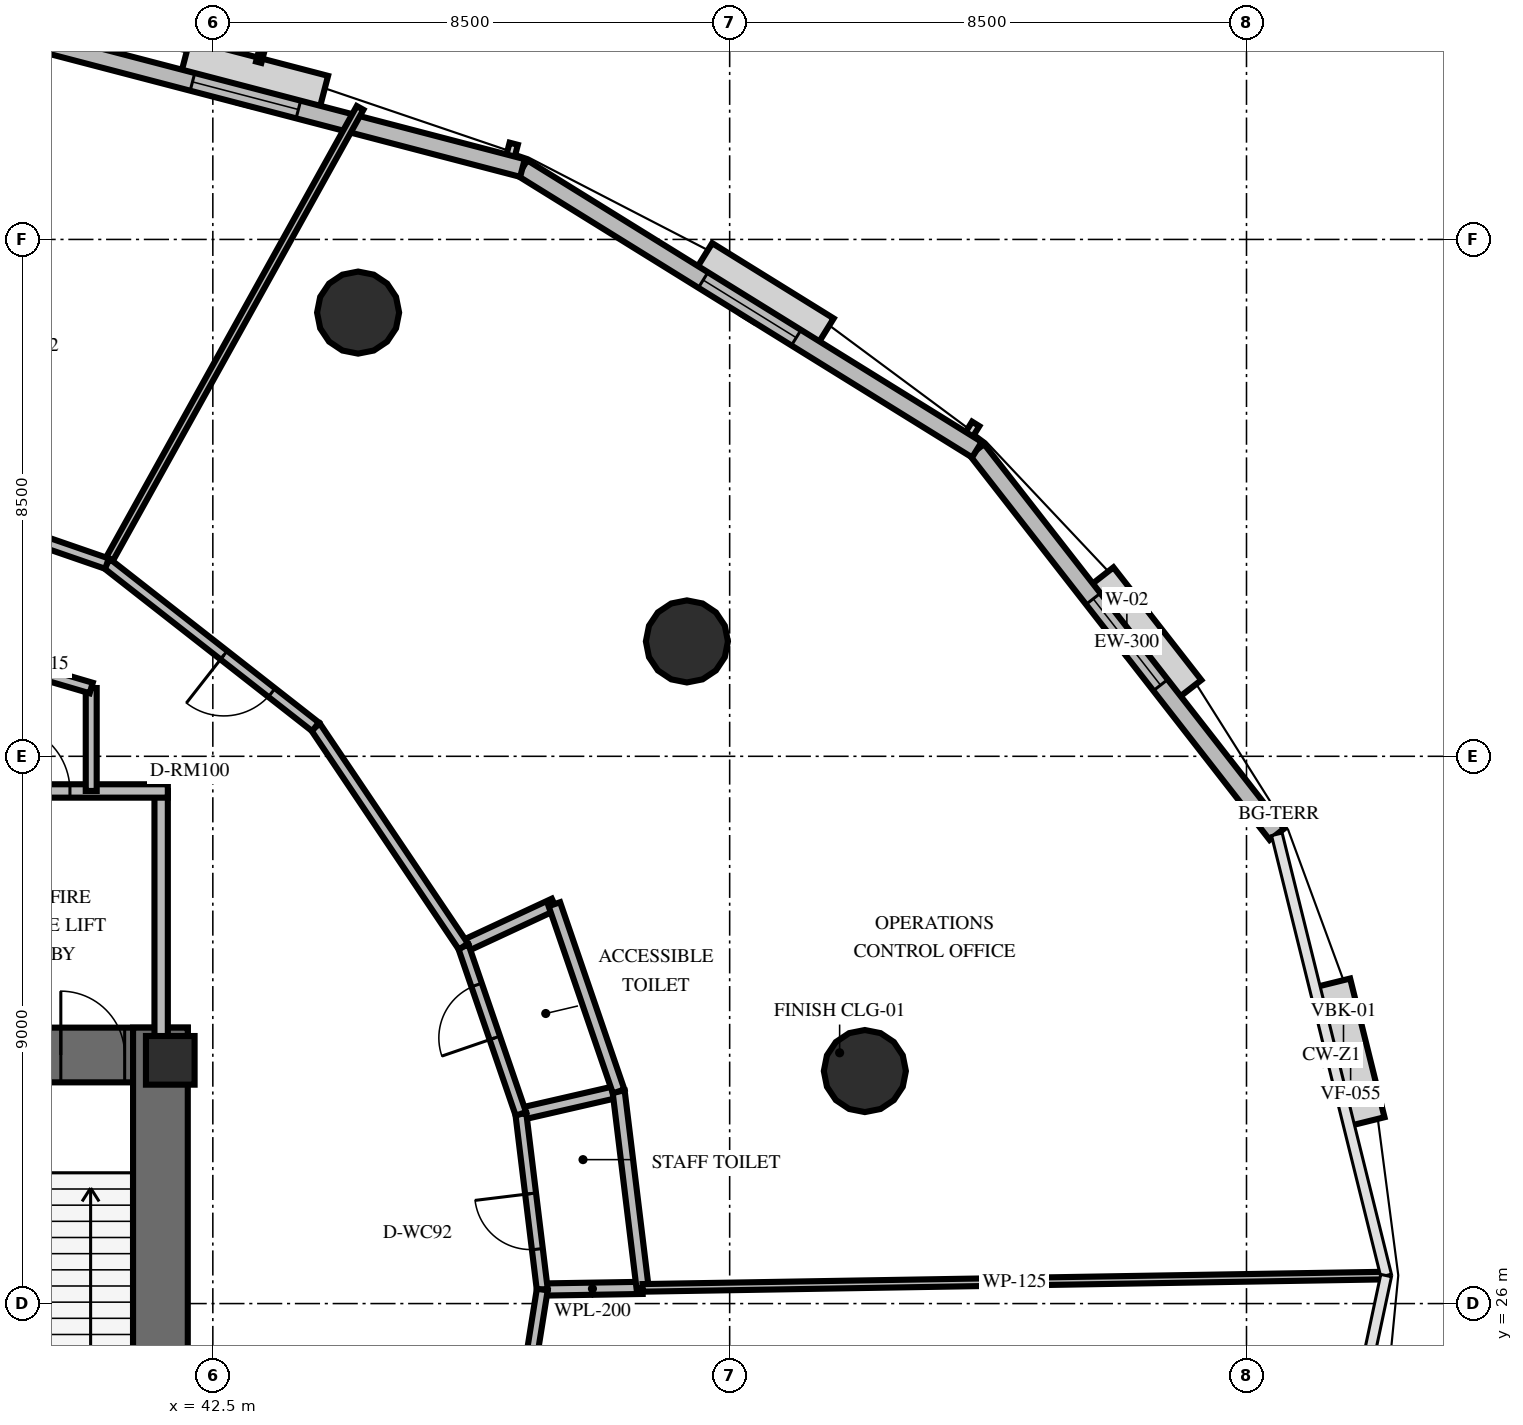
"""IFC4 building model, lengths in metres.
Left out: names, types, materials, properties, quantities, classifications, styles, units other than length and angle.
Written with IfcOpenShell. Run it as: python <this file> out.ifc"""

import sys

from ifc_helpers import new_model, si_unit, direction, frame, frame_2d, origin, origin_2d, place, context, subcontext, project, spatial, rectangle, circle, extrude, element, fill, save


model = new_model("IFC4")
c1 = context("Model", 3, precision=1e-05, world=origin(), true_north=direction((0.0, 1.0)))
c2 = subcontext(c1, "Body", "Model", "MODEL_VIEW")
j1 = project(units=[si_unit("LENGTHUNIT", "METRE"), si_unit("PLANEANGLEUNIT", "RADIAN")], contexts=[c1])
p1 = place(None, origin())
s1 = spatial("IfcSite", under=j1, at=p1, CompositionType="ELEMENT")
p2 = place(p1, origin())
s2 = spatial("IfcBuilding", under=s1, at=p2, CompositionType="ELEMENT")
p3 = place(p2, frame((0.0, 0.0, 34.2)))
s3 = spatial("IfcBuildingStorey", under=s2, at=p3, CompositionType="ELEMENT", Elevation=34.2)
p4 = place(p3, frame((25.922, 30.088, 0.0), z_axis=(0.0, 0.0, 1.0), x_axis=(1.0, 0.0, 0.0)))
e1 = element("IfcWall", 1, at=p4, inside=s3, PredefinedType="SHEAR", context=c2, shape_type="SweptSolid", body=[
    extrude(rectangle(XDim=16.166, YDim=0.9, at=frame_2d((8.083, 0.0))), origin(), (0.0, 0.0, 1.0), 4.2),
])
p5 = place(p4, frame((1.028, 0.0, 0.0)))
e2 = element("IfcOpeningElement", 2, at=p5, cuts=e1, PredefinedType="OPENING", context=c2, shape_type="SweptSolid", body=[
    extrude(rectangle(XDim=1.05, YDim=2.15, at=frame_2d((0.525, 1.075))), frame((0.0, 0.46, 0.0), z_axis=(0.0, -1.0, 0.0), x_axis=(1.0, 0.0, 0.0)), (0.0, 0.0, 1.0), 0.92),
])
p6 = place(p4, frame((14.078, 0.0, 0.0)))
e3 = element("IfcOpeningElement", 3, at=p6, cuts=e1, PredefinedType="OPENING", context=c2, shape_type="SweptSolid", body=[
    extrude(rectangle(XDim=1.05, YDim=2.15, at=frame_2d((0.525, 1.075))), frame((0.0, 0.46, 0.0), z_axis=(0.0, -1.0, 0.0), x_axis=(1.0, 0.0, 0.0)), (0.0, 0.0, 1.0), 0.92),
])
p7 = place(p4, frame((7.528, 0.0, 0.0)))
e4 = element("IfcOpeningElement", 4, at=p7, cuts=e1, PredefinedType="OPENING", context=c2, shape_type="SweptSolid", body=[
    extrude(rectangle(XDim=1.1, YDim=2.15, at=frame_2d((0.55, 1.075))), frame((0.0, 0.46, 0.0), z_axis=(0.0, -1.0, 0.0), x_axis=(1.0, 0.0, 0.0)), (0.0, 0.0, 1.0), 0.92),
])
p8 = place(p3, frame((41.638, 19.662, 0.0), z_axis=(0.0, 0.0, 1.0), x_axis=(0.0, 1.0, 0.0)))
e5 = element("IfcWall", 5, at=p8, inside=s3, PredefinedType="SHEAR", context=c2, shape_type="SweptSolid", body=[
    extrude(rectangle(XDim=10.876, YDim=0.9, at=frame_2d((5.438, 0.0))), origin(), (0.0, 0.0, 1.0), 4.2),
])
p9 = place(p3, frame((41.8, 30.0, 0.0), z_axis=(0.0, 0.0, 1.0), x_axis=(1.0, 0.0, 0.0)))
e6 = element("IfcColumn", 6, at=p9, inside=s3, PredefinedType="PILASTER", context=c2, shape_type="SweptSolid", body=[
    extrude(rectangle(XDim=0.8, YDim=0.8, at=origin_2d()), origin(), (0.0, 0.0, 1.0), 4.2),
])
for number, where, z_axis, x_axis in (
    (7, (53.223, 29.824, 0.0), (0.0, 0.0, 1.0), (1.0, 0.0, 0.0)),
    (8, (50.297, 36.889, 0.0), (0.0, 0.0, 1.0), (1.0, 0.0, 0.0)),
    (9, (44.889, 42.297, 0.0), (0.0, 0.0, 1.0), (1.0, 0.0, 0.0)),
):
    element("IfcColumn", number, at=place(p3, frame(where, z_axis=z_axis, x_axis=x_axis)), inside=s3, PredefinedType="COLUMN", context=c2, shape_type="SweptSolid", body=[
        extrude(circle(Radius=0.675, at=origin_2d()), origin(), (0.0, 0.0, 1.0), 4.2),
    ])
p10 = place(p3, frame((59.999, 33.717, 0.0), z_axis=(0.0, 0.0, 1.0), x_axis=(-0.61497048471, 0.788550127091, 0.0)))
e10 = element("IfcWall", 10, at=p10, inside=s3, PredefinedType="SOLIDWALL", context=c2, shape_type="SweptSolid", body=[
    extrude(rectangle(XDim=8.021, YDim=0.3, at=frame_2d((4.011, 0.0))), origin(), (0.0, 0.0, 1.0), 3.0),
])
p11 = place(p10, frame((3.111, 0.0, 0.8)))
e11 = element("IfcOpeningElement", 11, at=p11, cuts=e10, PredefinedType="OPENING", context=c2, shape_type="SweptSolid", body=[
    extrude(rectangle(XDim=1.8, YDim=1.95, at=frame_2d((0.9, 0.975))), frame((0.0, 0.16, 0.0), z_axis=(0.0, -1.0, 0.0), x_axis=(1.0, 0.0, 0.0)), (0.0, 0.0, 1.0), 0.32),
])
p12 = place(p3, frame((55.066, 40.042, 0.0), z_axis=(0.0, 0.0, 1.0), x_axis=(-0.850002902168, 0.526778004767, 0.0)))
e12 = element("IfcWall", 12, at=p12, inside=s3, PredefinedType="SOLIDWALL", context=c2, shape_type="SweptSolid", body=[
    extrude(rectangle(XDim=8.793, YDim=0.3, at=frame_2d((4.396, 0.0))), origin(), (0.0, 0.0, 1.0), 3.0),
])
p13 = place(p12, frame((3.496, 0.0, 0.8)))
e13 = element("IfcOpeningElement", 13, at=p13, cuts=e12, PredefinedType="OPENING", context=c2, shape_type="SweptSolid", body=[
    extrude(rectangle(XDim=1.8, YDim=1.95, at=frame_2d((0.9, 0.975))), frame((0.0, 0.16, 0.0), z_axis=(0.0, -1.0, 0.0), x_axis=(1.0, 0.0, 0.0)), (0.0, 0.0, 1.0), 0.32),
])
p14 = place(p3, frame((47.592, 44.674, 0.0), z_axis=(0.0, 0.0, 1.0), x_axis=(-0.967564951613, 0.252622375118, 0.0)))
e14 = element("IfcWall", 14, at=p14, inside=s3, PredefinedType="SOLIDWALL", context=c2, shape_type="SweptSolid", body=[
    extrude(rectangle(XDim=9.419, YDim=0.3, at=frame_2d((4.709, 0.0))), origin(), (0.0, 0.0, 1.0), 3.0),
])
p15 = place(p14, frame((3.809, 0.0, 0.8)))
e15 = element("IfcOpeningElement", 15, at=p15, cuts=e14, PredefinedType="OPENING", context=c2, shape_type="SweptSolid", body=[
    extrude(rectangle(XDim=1.8, YDim=1.95, at=frame_2d((0.9, 0.975))), frame((0.0, 0.16, 0.0), z_axis=(0.0, -1.0, 0.0), x_axis=(1.0, 0.0, 0.0)), (0.0, 0.0, 1.0), 0.32),
])
p16 = place(p3, frame((41.65, 30.05, 0.0), z_axis=(0.0, 0.0, 1.0), x_axis=(0.0, 1.0, 0.0)))
e16 = element("IfcWall", 16, at=p16, inside=s3, PredefinedType="SOLIDWALL", context=c2, shape_type="SweptSolid", body=[
    extrude(rectangle(XDim=4.38, YDim=0.22, at=frame_2d((2.19, 0.0))), origin(), (0.0, 0.0, 1.0), 3.0),
])
p17 = place(p3, frame((37.45, 34.43, 0.0), z_axis=(0.0, 0.0, 1.0), x_axis=(1.0, 0.0, 0.0)))
e17 = element("IfcWall", 17, at=p17, inside=s3, PredefinedType="SOLIDWALL", context=c2, shape_type="SweptSolid", body=[
    extrude(rectangle(XDim=4.31, YDim=0.22, at=frame_2d((2.155, 0.0))), origin(), (0.0, 0.0, 1.0), 3.0),
])
p18 = place(p17, frame((1.6, 0.0, 0.0)))
e18 = element("IfcOpeningElement", 18, at=p18, cuts=e17, PredefinedType="OPENING", context=c2, shape_type="SweptSolid", body=[
    extrude(rectangle(XDim=1.1, YDim=2.15, at=frame_2d((0.55, 1.075))), frame((0.0, 0.12, 0.0), z_axis=(0.0, -1.0, 0.0), x_axis=(1.0, 0.0, 0.0)), (0.0, 0.0, 1.0), 0.24),
])
p19 = place(p3, frame((40.5, 36.123, 0.0), z_axis=(0.0, 0.0, 1.0), x_axis=(0.0, -1.0, 0.0)))
e19 = element("IfcWall", 19, at=p19, inside=s3, PredefinedType="PARTITIONING", context=c2, shape_type="SweptSolid", body=[
    extrude(rectangle(XDim=1.693, YDim=0.18, at=frame_2d((0.846, 0.0))), origin(), (0.0, 0.0, 1.0), 3.0),
])
p20 = place(p3, frame((34.0, 38.03, 0.0), z_axis=(0.0, 0.0, 1.0), x_axis=(0.959546654541, -0.281549671923, 0.0)))
e20 = element("IfcWall", 20, at=p20, inside=s3, PredefinedType="PARTITIONING", context=c2, shape_type="SweptSolid", body=[
    extrude(rectangle(XDim=6.774, YDim=0.18, at=frame_2d((3.387, 0.0))), origin(), (0.0, 0.0, 1.0), 3.0),
])
p21 = place(p20, frame((2.837, 0.0, 0.0)))
e21 = element("IfcOpeningElement", 21, at=p21, cuts=e20, PredefinedType="OPENING", context=c2, shape_type="SweptSolid", body=[
    extrude(rectangle(XDim=1.1, YDim=2.15, at=frame_2d((0.55, 1.075))), frame((0.0, 0.1, 0.0), z_axis=(0.0, -1.0, 0.0), x_axis=(1.0, 0.0, 0.0)), (0.0, 0.0, 1.0), 0.2),
])
p22 = place(p3, frame((47.918, 26.231, 0.0), z_axis=(0.0, 0.0, 1.0), x_axis=(0.999862656303, 0.016573126758, 0.0)))
e22 = element("IfcWall", 22, at=p22, inside=s3, PredefinedType="PLUMBINGWALL", context=c2, shape_type="SweptSolid", body=[
    extrude(rectangle(XDim=1.65, YDim=0.2, at=frame_2d((0.825, 0.0))), origin(), (0.0, 0.0, 1.0), 3.0),
])
p23 = place(p3, frame((47.566, 29.119, 0.0), z_axis=(0.0, 0.0, 1.0), x_axis=(0.974555509805, 0.224146287742, 0.0)))
e23 = element("IfcWall", 23, at=p23, inside=s3, PredefinedType="PLUMBINGWALL", context=c2, shape_type="SweptSolid", body=[
    extrude(rectangle(XDim=1.65, YDim=0.2, at=frame_2d((0.825, 0.0))), origin(), (0.0, 0.0, 1.0), 3.0),
])
p24 = place(p3, frame((49.568, 26.258, 0.0), z_axis=(0.0, 0.0, 1.0), x_axis=(-0.120978669263, 0.992655107066, 0.0)))
e24 = element("IfcWall", 24, at=p24, inside=s3, PredefinedType="PLUMBINGWALL", context=c2, shape_type="SweptSolid", body=[
    extrude(rectangle(XDim=3.255, YDim=0.2, at=frame_2d((1.627, 0.0))), origin(), (0.0, 0.0, 1.0), 3.0),
])
p25 = place(p3, frame((47.918, 26.231, 0.0), z_axis=(0.0, 0.0, 1.0), x_axis=(-0.121060424007, 0.992645139886, 0.0)))
e25 = element("IfcWall", 25, at=p25, inside=s3, PredefinedType="PARTITIONING", context=c2, shape_type="SweptSolid", body=[
    extrude(rectangle(XDim=2.91, YDim=0.18, at=frame_2d((1.455, 0.0))), origin(), (0.0, 0.0, 1.0), 3.0),
])
p26 = place(p25, frame((0.669, 0.0, 0.0)))
e26 = element("IfcOpeningElement", 26, at=p26, cuts=e25, PredefinedType="OPENING", context=c2, shape_type="SweptSolid", body=[
    extrude(rectangle(XDim=0.92, YDim=2.1, at=frame_2d((0.46, 1.05))), frame((0.0, 0.1, 0.0), z_axis=(0.0, -1.0, 0.0), x_axis=(1.0, 0.0, 0.0)), (0.0, 0.0, 1.0), 0.2),
])
p27 = place(p3, frame((46.621, 31.872, 0.0), z_axis=(0.0, 0.0, 1.0), x_axis=(0.9066776872, 0.421824100229, 0.0)))
e27 = element("IfcWall", 27, at=p27, inside=s3, PredefinedType="PLUMBINGWALL", context=c2, shape_type="SweptSolid", body=[
    extrude(rectangle(XDim=1.65, YDim=0.2, at=frame_2d((0.825, 0.0))), origin(), (0.0, 0.0, 1.0), 3.0),
])
p28 = place(p3, frame((49.174, 29.489, 0.0), z_axis=(0.0, 0.0, 1.0), x_axis=(-0.324765325225, 0.945794630737, 0.0)))
e28 = element("IfcWall", 28, at=p28, inside=s3, PredefinedType="PLUMBINGWALL", context=c2, shape_type="SweptSolid", body=[
    extrude(rectangle(XDim=3.255, YDim=0.2, at=frame_2d((1.627, 0.0))), origin(), (0.0, 0.0, 1.0), 3.0),
])
p29 = place(p3, frame((47.566, 29.119, 0.0), z_axis=(0.0, 0.0, 1.0), x_axis=(-0.324746817111, 0.945800985819, 0.0)))
e29 = element("IfcWall", 29, at=p29, inside=s3, PredefinedType="PARTITIONING", context=c2, shape_type="SweptSolid", body=[
    extrude(rectangle(XDim=2.91, YDim=0.18, at=frame_2d((1.455, 0.0))), origin(), (0.0, 0.0, 1.0), 3.0),
])
p30 = place(p29, frame((1.321, 0.0, 0.0)))
e30 = element("IfcOpeningElement", 30, at=p30, cuts=e29, PredefinedType="OPENING", context=c2, shape_type="SweptSolid", body=[
    extrude(rectangle(XDim=0.92, YDim=2.1, at=frame_2d((0.46, 1.05))), frame((0.0, 0.1, 0.0), z_axis=(0.0, -1.0, 0.0), x_axis=(1.0, 0.0, 0.0)), (0.0, 0.0, 1.0), 0.2),
])
p31 = place(p3, frame((49.568, 26.258, 0.0), z_axis=(0.0, 0.0, 1.0), x_axis=(0.999862395587, 0.016588848418, 0.0)))
e31 = element("IfcWall", 31, at=p31, inside=s3, PredefinedType="PARTITIONING", context=c2, shape_type="SweptSolid", body=[
    extrude(rectangle(XDim=12.23, YDim=0.125, at=frame_2d((6.115, 0.0))), origin(), (0.0, 0.0, 1.0), 3.0),
])
p32 = place(p3, frame((40.759, 38.169, 0.0), z_axis=(0.0, 0.0, 1.0), x_axis=(0.48555829942, 0.874204288404, 0.0)))
e32 = element("IfcWall", 32, at=p32, inside=s3, PredefinedType="PARTITIONING", context=c2, shape_type="SweptSolid", body=[
    extrude(rectangle(XDim=8.573, YDim=0.125, at=frame_2d((4.286, 0.0))), origin(), (0.0, 0.0, 1.0), 3.0),
])
p33 = place(p3, frame((46.621, 31.872, 0.0), z_axis=(0.0, 0.0, 1.0), x_axis=(-0.558446106931, 0.829540804092, 0.0)))
e33 = element("IfcWall", 33, at=p33, inside=s3, PredefinedType="PARTITIONING", context=c2, shape_type="SweptSolid", body=[
    extrude(rectangle(XDim=4.355, YDim=0.18, at=frame_2d((2.178, 0.0))), origin(), (0.0, 0.0, 1.0), 3.0),
])
p34 = place(p3, frame((44.189, 35.485, 0.0), z_axis=(0.0, 0.0, 1.0), x_axis=(-0.787486072722, 0.616332447035, 0.0)))
e34 = element("IfcWall", 34, at=p34, inside=s3, PredefinedType="PARTITIONING", context=c2, shape_type="SweptSolid", body=[
    extrude(rectangle(XDim=4.355, YDim=0.18, at=frame_2d((2.177, 0.0))), origin(), (0.0, 0.0, 1.0), 3.0),
])
p35 = place(p34, frame((0.914, 0.0, 0.0)))
e35 = element("IfcOpeningElement", 35, at=p35, cuts=e34, PredefinedType="OPENING", context=c2, shape_type="SweptSolid", body=[
    extrude(rectangle(XDim=1.0, YDim=2.15, at=frame_2d((0.5, 1.075))), frame((0.0, 0.1, 0.0), z_axis=(0.0, -1.0, 0.0), x_axis=(1.0, 0.0, 0.0)), (0.0, 0.0, 1.0), 0.2),
])
p36 = place(p3, frame((40.759, 38.169, 0.0), z_axis=(0.0, 0.0, 1.0), x_axis=(-0.945234970724, 0.326390640369, 0.0)))
e36 = element("IfcWall", 36, at=p36, inside=s3, PredefinedType="PARTITIONING", context=c2, shape_type="SweptSolid", body=[
    extrude(rectangle(XDim=4.834, YDim=0.18, at=frame_2d((2.417, 0.0))), origin(), (0.0, 0.0, 1.0), 3.0),
])
p37 = place(p36, frame((0.996, 0.0, 0.0)))
e37 = element("IfcOpeningElement", 37, at=p37, cuts=e36, PredefinedType="OPENING", context=c2, shape_type="SweptSolid", body=[
    extrude(rectangle(XDim=1.15, YDim=2.15, at=frame_2d((0.575, 1.075))), frame((0.0, 0.1, 0.0), z_axis=(0.0, -1.0, 0.0), x_axis=(1.0, 0.0, 0.0)), (0.0, 0.0, 1.0), 0.2),
])
p38 = place(p3, frame((47.158, 21.457, 0.0), z_axis=(0.0, 0.0, 1.0), x_axis=(0.15731094414, 0.987549121236, 0.0)))
e38 = element("IfcWall", 38, at=p38, inside=s3, PredefinedType="PARTITIONING", context=c2, shape_type="SweptSolid", body=[
    extrude(rectangle(XDim=4.834, YDim=0.18, at=frame_2d((2.417, 0.0))), origin(), (0.0, 0.0, 1.0), 3.0),
])
p39 = place(p11, origin())
e39 = element("IfcWindow", 39, at=p39, inside=s3, PartitioningType="SINGLE_PANEL", PredefinedType="WINDOW", context=c2, shape_type="SweptSolid", body=[
    extrude(rectangle(XDim=1.8, YDim=1.95, at=frame_2d((0.9, 0.975))), frame((0.0, 0.03, 0.0), z_axis=(0.0, -1.0, 0.0), x_axis=(1.0, 0.0, 0.0)), (0.0, 0.0, 1.0), 0.06),
])
fill(e11, e39)
p40 = place(p13, origin())
e40 = element("IfcWindow", 40, at=p40, inside=s3, PartitioningType="SINGLE_PANEL", PredefinedType="WINDOW", context=c2, shape_type="SweptSolid", body=[
    extrude(rectangle(XDim=1.8, YDim=1.95, at=frame_2d((0.9, 0.975))), frame((0.0, 0.03, 0.0), z_axis=(0.0, -1.0, 0.0), x_axis=(1.0, 0.0, 0.0)), (0.0, 0.0, 1.0), 0.06),
])
fill(e13, e40)
p41 = place(p15, origin())
e41 = element("IfcWindow", 41, at=p41, inside=s3, PartitioningType="SINGLE_PANEL", PredefinedType="WINDOW", context=c2, shape_type="SweptSolid", body=[
    extrude(rectangle(XDim=1.8, YDim=1.95, at=frame_2d((0.9, 0.975))), frame((0.0, 0.03, 0.0), z_axis=(0.0, -1.0, 0.0), x_axis=(1.0, 0.0, 0.0)), (0.0, 0.0, 1.0), 0.06),
])
fill(e15, e41)
p42 = place(p6, origin())
e42 = element("IfcDoor", 42, at=p42, inside=s3, OperationType="SINGLE_SWING_LEFT", PredefinedType="DOOR", context=c2, shape_type="SweptSolid", body=[
    extrude(rectangle(XDim=1.05, YDim=2.15, at=frame_2d((0.525, 1.075))), frame((0.0, 0.025, 0.0), z_axis=(0.0, -1.0, 0.0), x_axis=(1.0, 0.0, 0.0)), (0.0, 0.0, 1.0), 0.05),
])
fill(e3, e42)
p43 = place(p18, origin())
e43 = element("IfcDoor", 43, at=p43, inside=s3, OperationType="SINGLE_SWING_LEFT", PredefinedType="DOOR", context=c2, shape_type="SweptSolid", body=[
    extrude(rectangle(XDim=1.1, YDim=2.15, at=frame_2d((0.55, 1.075))), frame((0.0, 0.025, 0.0), z_axis=(0.0, -1.0, 0.0), x_axis=(1.0, 0.0, 0.0)), (0.0, 0.0, 1.0), 0.05),
])
fill(e18, e43)
p44 = place(p26, origin())
e44 = element("IfcDoor", 44, at=p44, inside=s3, OperationType="SINGLE_SWING_RIGHT", PredefinedType="DOOR", context=c2, shape_type="SweptSolid", body=[
    extrude(rectangle(XDim=0.92, YDim=2.1, at=frame_2d((0.46, 1.05))), frame((0.0, 0.025, 0.0), z_axis=(0.0, -1.0, 0.0), x_axis=(1.0, 0.0, 0.0)), (0.0, 0.0, 1.0), 0.05),
])
fill(e26, e44)
p45 = place(p30, origin())
e45 = element("IfcDoor", 45, at=p45, inside=s3, OperationType="SINGLE_SWING_LEFT", PredefinedType="DOOR", context=c2, shape_type="SweptSolid", body=[
    extrude(rectangle(XDim=0.92, YDim=2.1, at=frame_2d((0.46, 1.05))), frame((0.0, 0.025, 0.0), z_axis=(0.0, -1.0, 0.0), x_axis=(1.0, 0.0, 0.0)), (0.0, 0.0, 1.0), 0.05),
])
fill(e30, e45)
p46 = place(p35, origin())
e46 = element("IfcDoor", 46, at=p46, inside=s3, OperationType="SINGLE_SWING_RIGHT", PredefinedType="DOOR", context=c2, shape_type="SweptSolid", body=[
    extrude(rectangle(XDim=1.0, YDim=2.15, at=frame_2d((0.5, 1.075))), frame((0.0, 0.025, 0.0), z_axis=(0.0, -1.0, 0.0), x_axis=(1.0, 0.0, 0.0)), (0.0, 0.0, 1.0), 0.05),
])
fill(e35, e46)
save(model, sys.argv[1])
